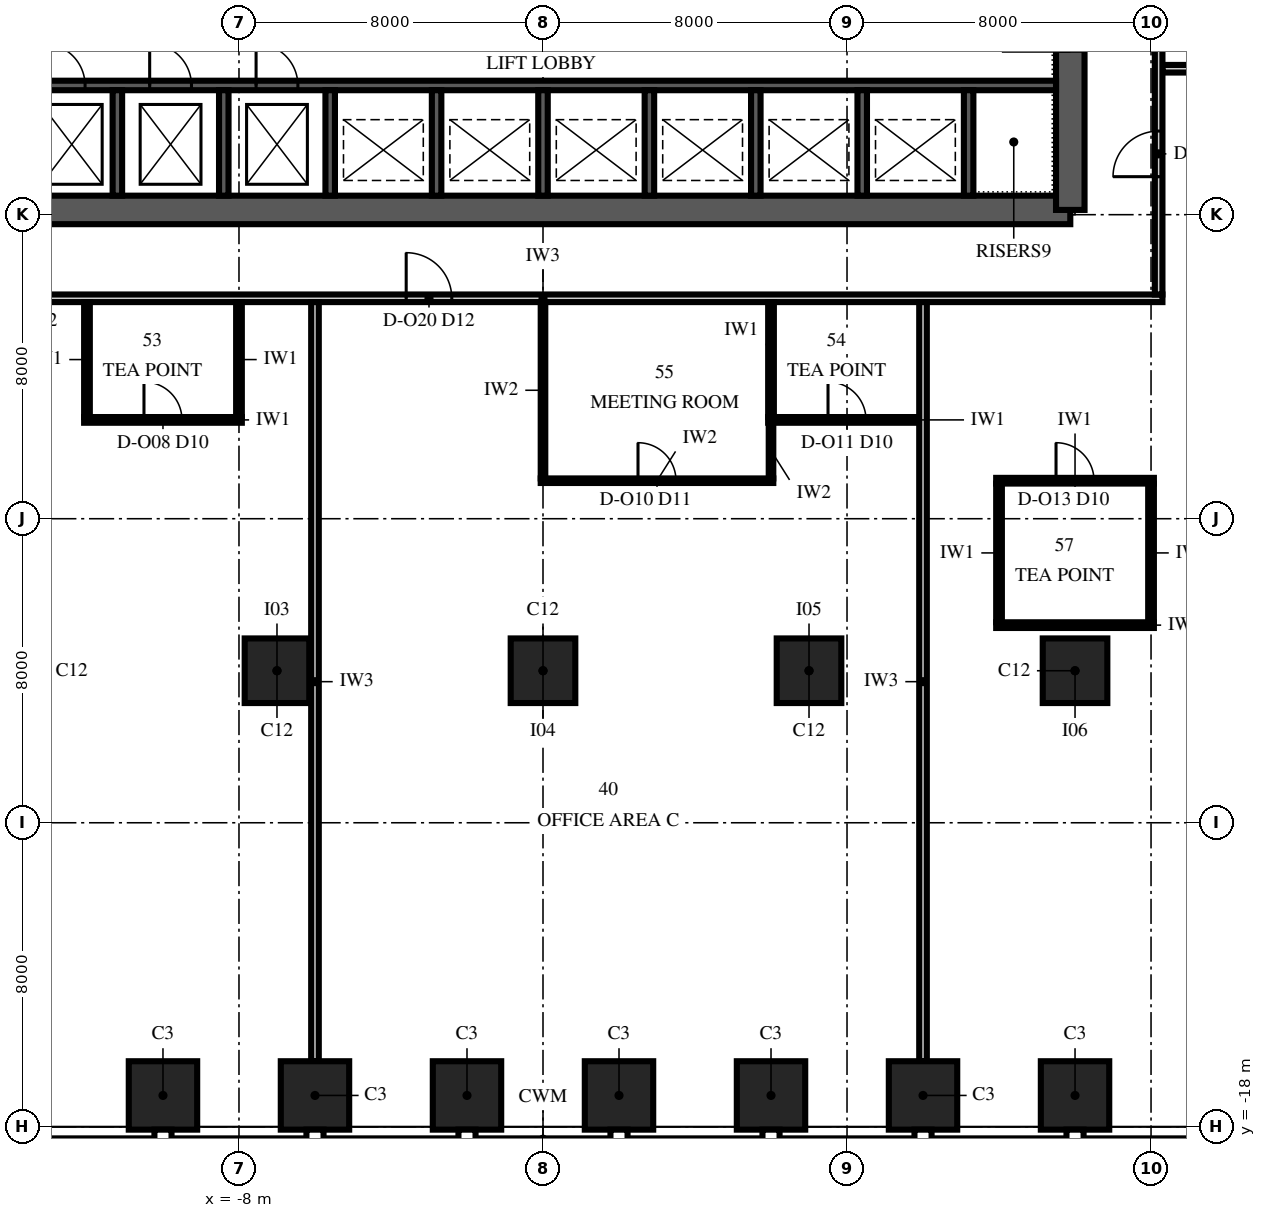
"""IFC4 building model, lengths in metres.
Left out: names, types, materials, properties, quantities, classifications, styles, units other than length and angle.
Written with IfcOpenShell. Run it as: python <this file> out.ifc"""

import sys

from ifc_helpers import new_model, si_unit, direction, frame, frame_2d, origin, origin_2d, place, context, subcontext, project, spatial, polyline, rectangle, outline, extrude, element, fill, save


model = new_model("IFC4")
c1 = context("Model", 3, precision=1e-05, world=origin(), true_north=direction((0.0, 1.0)))
c2 = subcontext(c1, "Body", "Model", "MODEL_VIEW")
j1 = project(units=[si_unit("LENGTHUNIT", "METRE"), si_unit("PLANEANGLEUNIT", "RADIAN")], contexts=[c1])
p1 = place(None, origin())
s1 = spatial("IfcSite", under=j1, at=p1, CompositionType="ELEMENT")
p2 = place(p1, origin())
s2 = spatial("IfcBuilding", under=s1, at=p2, CompositionType="ELEMENT")
p3 = place(p2, frame((0.0, 0.0, 151.0)))
s3 = spatial("IfcBuildingStorey", under=s2, at=p3, CompositionType="ELEMENT", Elevation=151.0)
for number, where, z_axis, x_axis in (
    (1, (-10.0, -17.175, 0.0), (0.0, 0.0, 1.0), (1.0, 0.0, 0.0)),
    (2, (-6.0, -17.175, 0.0), (0.0, 0.0, 1.0), (1.0, 0.0, 0.0)),
    (3, (-2.0, -17.175, 0.0), (0.0, 0.0, 1.0), (1.0, 0.0, 0.0)),
    (4, (2.0, -17.175, 0.0), (0.0, 0.0, 1.0), (1.0, 0.0, 0.0)),
    (5, (6.0, -17.175, 0.0), (0.0, 0.0, 1.0), (1.0, 0.0, 0.0)),
    (6, (10.0, -17.175, 0.0), (0.0, 0.0, 1.0), (1.0, 0.0, 0.0)),
    (7, (14.0, -17.175, 0.0), (0.0, 0.0, 1.0), (1.0, 0.0, 0.0)),
):
    element("IfcColumn", number, at=place(p3, frame(where, z_axis=z_axis, x_axis=x_axis)), inside=s3, PredefinedType="COLUMN", context=c2, shape_type="SweptSolid", body=[
        extrude(rectangle(XDim=1.8, YDim=1.8, at=origin_2d()), origin(), (0.0, 0.0, 1.0), 4.0),
    ])
for number, where, z_axis, x_axis in (
    (8, (-7.0, -6.0, 0.0), (0.0, 0.0, 1.0), (1.0, 0.0, 0.0)),
    (9, (0.0, -6.0, 0.0), (0.0, 0.0, 1.0), (1.0, 0.0, 0.0)),
    (10, (7.0, -6.0, 0.0), (0.0, 0.0, 1.0), (1.0, 0.0, 0.0)),
    (11, (14.0, -6.0, 0.0), (0.0, 0.0, 1.0), (1.0, 0.0, 0.0)),
):
    element("IfcColumn", number, at=place(p3, frame(where, z_axis=z_axis, x_axis=x_axis)), inside=s3, PredefinedType="COLUMN", context=c2, shape_type="SweptSolid", body=[
        extrude(rectangle(XDim=1.7, YDim=1.7, at=origin_2d()), origin(), (0.0, 0.0, 1.0), 4.0),
    ])
p4 = place(p3, frame((-13.875, 6.125, 0.0), z_axis=(0.0, 0.0, 1.0), x_axis=(1.0, 0.0, 0.0)))
e12 = element("IfcWall", 12, at=p4, inside=s3, PredefinedType="SHEAR", context=c2, shape_type="SweptSolid", body=[
    extrude(rectangle(XDim=27.75, YDim=0.75, at=frame_2d((13.875, 0.0))), origin(), (0.0, 0.0, 1.0), 4.0),
])
p5 = place(p3, frame((13.875, 6.125, 0.0), z_axis=(0.0, 0.0, 1.0), x_axis=(0.0, 1.0, 0.0)))
e13 = element("IfcWall", 13, at=p5, inside=s3, PredefinedType="SHEAR", context=c2, shape_type="SweptSolid", body=[
    extrude(outline(polyline([(0.0, -0.375), (17.75, -0.375), (17.75, 0.0), (17.375, 0.0), (17.375, 0.375), (0.375, 0.375), (0.375, 0.0), (0.0, 0.0), (0.0, -0.375)])), origin(), (0.0, 0.0, 1.0), 4.0),
])
p6 = place(p5, frame((4.175, 0.0, 0.0)))
e14 = element("IfcOpeningElement", 14, at=p6, cuts=e13, PredefinedType="OPENING", context=c2, shape_type="SweptSolid", body=[
    extrude(rectangle(XDim=1.8, YDim=2.4, at=frame_2d((0.9, 1.2))), frame((0.0, 0.39, 0.0), z_axis=(0.0, -1.0, 0.0), x_axis=(1.0, 0.0, 0.0)), (0.0, 0.0, 1.0), 0.78),
])
p7 = place(p3, frame((-13.5, 9.4, 0.0), z_axis=(0.0, 0.0, 1.0), x_axis=(1.0, 0.0, 0.0)))
e15 = element("IfcWall", 15, at=p7, inside=s3, PredefinedType="SHEAR", context=c2, shape_type="SweptSolid", body=[
    extrude(rectangle(XDim=27.0, YDim=0.25, at=frame_2d((13.5, 0.0))), origin(), (0.0, 0.0, 1.0), 4.0),
])
p8 = place(p7, frame((0.35, 0.0, 0.0)))
e16 = element("IfcOpeningElement", 16, at=p8, cuts=e15, PredefinedType="OPENING", context=c2, shape_type="SweptSolid", body=[
    extrude(rectangle(XDim=1.1, YDim=2.1, at=frame_2d((0.55, 1.05))), frame((0.0, 0.14, 0.0), z_axis=(0.0, -1.0, 0.0), x_axis=(1.0, 0.0, 0.0)), (0.0, 0.0, 1.0), 0.28),
])
p9 = place(p7, frame((3.15, 0.0, 0.0)))
e17 = element("IfcOpeningElement", 17, at=p9, cuts=e15, PredefinedType="OPENING", context=c2, shape_type="SweptSolid", body=[
    extrude(rectangle(XDim=1.1, YDim=2.1, at=frame_2d((0.55, 1.05))), frame((0.0, 0.14, 0.0), z_axis=(0.0, -1.0, 0.0), x_axis=(1.0, 0.0, 0.0)), (0.0, 0.0, 1.0), 0.28),
])
p10 = place(p7, frame((5.95, 0.0, 0.0)))
e18 = element("IfcOpeningElement", 18, at=p10, cuts=e15, PredefinedType="OPENING", context=c2, shape_type="SweptSolid", body=[
    extrude(rectangle(XDim=1.1, YDim=2.1, at=frame_2d((0.55, 1.05))), frame((0.0, 0.14, 0.0), z_axis=(0.0, -1.0, 0.0), x_axis=(1.0, 0.0, 0.0)), (0.0, 0.0, 1.0), 0.28),
])
for number, where, z_axis, x_axis in (
    (19, (-11.2, 6.5, 0.0), (0.0, 0.0, 1.0), (0.0, 1.0, 0.0)),
    (20, (-8.4, 6.5, 0.0), (0.0, 0.0, 1.0), (0.0, 1.0, 0.0)),
    (21, (-5.6, 6.5, 0.0), (0.0, 0.0, 1.0), (0.0, 1.0, 0.0)),
    (22, (-2.8, 6.5, 0.0), (0.0, 0.0, 1.0), (0.0, 1.0, 0.0)),
    (23, (0.0, 6.5, 0.0), (0.0, 0.0, 1.0), (0.0, 1.0, 0.0)),
    (24, (2.8, 6.5, 0.0), (0.0, 0.0, 1.0), (0.0, 1.0, 0.0)),
    (25, (5.6, 6.5, 0.0), (0.0, 0.0, 1.0), (0.0, 1.0, 0.0)),
    (26, (8.4, 6.5, 0.0), (0.0, 0.0, 1.0), (0.0, 1.0, 0.0)),
    (27, (11.2, 6.5, 0.0), (0.0, 0.0, 1.0), (0.0, 1.0, 0.0)),
):
    element("IfcWall", number, at=place(p3, frame(where, z_axis=z_axis, x_axis=x_axis)), inside=s3, PredefinedType="SHEAR", context=c2, shape_type="SweptSolid", body=[
        extrude(rectangle(XDim=2.775, YDim=0.25, at=frame_2d((1.387, 0.0))), origin(), (0.0, 0.0, 1.0), 4.0),
    ])
p11 = place(p3, frame((11.925, -4.8, 0.0), z_axis=(0.0, 0.0, 1.0), x_axis=(1.0, 0.0, 0.0)))
e28 = element("IfcWall", 28, at=p11, inside=s3, PredefinedType="PARTITIONING", context=c2, shape_type="SweptSolid", body=[
    extrude(rectangle(XDim=4.15, YDim=0.15, at=frame_2d((2.075, 0.0))), origin(), (0.0, 0.0, 1.0), 3.25),
])
p12 = place(p3, frame((-0.06, -1.0, 0.0), z_axis=(0.0, 0.0, 1.0), x_axis=(1.0, 0.0, 0.0)))
e29 = element("IfcWall", 29, at=p12, inside=s3, PredefinedType="PARTITIONING", context=c2, shape_type="SweptSolid", body=[
    extrude(rectangle(XDim=6.12, YDim=0.12, at=frame_2d((3.06, 0.0))), origin(), (0.0, 0.0, 1.0), 3.25),
])
p13 = place(p12, frame((2.56, 0.0, 0.0)))
e30 = element("IfcOpeningElement", 30, at=p13, cuts=e29, PredefinedType="OPENING", context=c2, shape_type="SweptSolid", body=[
    extrude(rectangle(XDim=1.0, YDim=2.4, at=frame_2d((0.5, 1.2))), frame((0.0, 0.075, 0.0), z_axis=(0.0, -1.0, 0.0), x_axis=(1.0, 0.0, 0.0)), (0.0, 0.0, 1.0), 0.15),
])
p14 = place(p3, frame((11.925, -1.0, 0.0), z_axis=(0.0, 0.0, 1.0), x_axis=(1.0, 0.0, 0.0)))
e31 = element("IfcWall", 31, at=p14, inside=s3, PredefinedType="PARTITIONING", context=c2, shape_type="SweptSolid", body=[
    extrude(rectangle(XDim=4.15, YDim=0.15, at=frame_2d((2.075, 0.0))), origin(), (0.0, 0.0, 1.0), 3.25),
])
p15 = place(p14, frame((1.575, 0.0, 0.0)))
e32 = element("IfcOpeningElement", 32, at=p15, cuts=e31, PredefinedType="OPENING", context=c2, shape_type="SweptSolid", body=[
    extrude(rectangle(XDim=1.0, YDim=2.3, at=frame_2d((0.5, 1.15))), frame((0.0, 0.09, 0.0), z_axis=(0.0, -1.0, 0.0), x_axis=(1.0, 0.0, 0.0)), (0.0, 0.0, 1.0), 0.18),
])
p16 = place(p3, frame((-12.075, 0.6, 0.0), z_axis=(0.0, 0.0, 1.0), x_axis=(1.0, 0.0, 0.0)))
e33 = element("IfcWall", 33, at=p16, inside=s3, PredefinedType="PARTITIONING", context=c2, shape_type="SweptSolid", body=[
    extrude(rectangle(XDim=4.15, YDim=0.15, at=frame_2d((2.075, 0.0))), origin(), (0.0, 0.0, 1.0), 3.25),
])
p17 = place(p16, frame((1.575, 0.0, 0.0)))
e34 = element("IfcOpeningElement", 34, at=p17, cuts=e33, PredefinedType="OPENING", context=c2, shape_type="SweptSolid", body=[
    extrude(rectangle(XDim=1.0, YDim=2.3, at=frame_2d((0.5, 1.15))), frame((0.0, 0.09, 0.0), z_axis=(0.0, -1.0, 0.0), x_axis=(1.0, 0.0, 0.0)), (0.0, 0.0, 1.0), 0.18),
])
p18 = place(p3, frame((5.925, 0.6, 0.0), z_axis=(0.0, 0.0, 1.0), x_axis=(1.0, 0.0, 0.0)))
e35 = element("IfcWall", 35, at=p18, inside=s3, PredefinedType="PARTITIONING", context=c2, shape_type="SweptSolid", body=[
    extrude(rectangle(XDim=3.975, YDim=0.15, at=frame_2d((1.987, 0.0))), origin(), (0.0, 0.0, 1.0), 3.85),
])
p19 = place(p18, frame((1.575, 0.0, 0.0)))
e36 = element("IfcOpeningElement", 36, at=p19, cuts=e35, PredefinedType="OPENING", context=c2, shape_type="SweptSolid", body=[
    extrude(rectangle(XDim=1.0, YDim=2.3, at=frame_2d((0.5, 1.15))), frame((0.0, 0.09, 0.0), z_axis=(0.0, -1.0, 0.0), x_axis=(1.0, 0.0, 0.0)), (0.0, 0.0, 1.0), 0.18),
])
p20 = place(p3, frame((-16.3, 3.8, 0.0), z_axis=(0.0, 0.0, 1.0), x_axis=(1.0, 0.0, 0.0)))
e37 = element("IfcWall", 37, at=p20, inside=s3, PredefinedType="PARTITIONING", context=c2, shape_type="SweptSolid", body=[
    extrude(rectangle(XDim=32.6, YDim=0.2, at=frame_2d((16.3, 0.0))), origin(), (0.0, 0.0, 1.0), 3.25),
])
p21 = place(p20, frame((1.7, 0.0, 0.0)))
e38 = element("IfcOpeningElement", 38, at=p21, cuts=e37, PredefinedType="OPENING", context=c2, shape_type="SweptSolid", body=[
    extrude(rectangle(XDim=1.2, YDim=2.4, at=frame_2d((0.6, 1.2))), frame((0.0, 0.115, 0.0), z_axis=(0.0, -1.0, 0.0), x_axis=(1.0, 0.0, 0.0)), (0.0, 0.0, 1.0), 0.23),
])
p22 = place(p20, frame((12.7, 0.0, 0.0)))
e39 = element("IfcOpeningElement", 39, at=p22, cuts=e37, PredefinedType="OPENING", context=c2, shape_type="SweptSolid", body=[
    extrude(rectangle(XDim=1.2, YDim=2.4, at=frame_2d((0.6, 1.2))), frame((0.0, 0.115, 0.0), z_axis=(0.0, -1.0, 0.0), x_axis=(1.0, 0.0, 0.0)), (0.0, 0.0, 1.0), 0.23),
])
p23 = place(p3, frame((16.3, 9.84, 0.0), z_axis=(0.0, 0.0, 1.0), x_axis=(1.0, 0.0, 0.0)))
e40 = element("IfcWall", 40, at=p23, inside=s3, PredefinedType="PARTITIONING", context=c2, shape_type="SweptSolid", body=[
    extrude(rectangle(XDim=9.373, YDim=0.2, at=frame_2d((4.687, 0.0))), origin(), (0.0, 0.0, 1.0), 3.25),
])
for number, where, z_axis, x_axis in (
    (41, (-12.0, 0.675, 0.0), (0.0, 0.0, 1.0), (0.0, 1.0, 0.0)),
    (42, (-8.0, 0.675, 0.0), (0.0, 0.0, 1.0), (0.0, 1.0, 0.0)),
):
    element("IfcWall", number, at=place(p3, frame(where, z_axis=z_axis, x_axis=x_axis)), inside=s3, PredefinedType="PARTITIONING", context=c2, shape_type="SweptSolid", body=[
        extrude(rectangle(XDim=3.025, YDim=0.15, at=frame_2d((1.512, 0.0))), origin(), (0.0, 0.0, 1.0), 3.85),
    ])
p24 = place(p3, frame((-6.0, -16.275, 0.0), z_axis=(0.0, 0.0, 1.0), x_axis=(0.0, 1.0, 0.0)))
e43 = element("IfcWall", 43, at=p24, inside=s3, PredefinedType="PARTITIONING", context=c2, shape_type="SweptSolid", body=[
    extrude(rectangle(XDim=19.975, YDim=0.2, at=frame_2d((9.987, 0.0))), origin(), (0.0, 0.0, 1.0), 2.842),
])
p25 = place(p3, frame((0.0, -0.94, 0.0), z_axis=(0.0, 0.0, 1.0), x_axis=(0.0, 1.0, 0.0)))
e44 = element("IfcWall", 44, at=p25, inside=s3, PredefinedType="PARTITIONING", context=c2, shape_type="SweptSolid", body=[
    extrude(rectangle(XDim=4.64, YDim=0.12, at=frame_2d((2.32, 0.0))), origin(), (0.0, 0.0, 1.0), 3.85),
])
p26 = place(p3, frame((6.0, -0.94, 0.0), z_axis=(0.0, 0.0, 1.0), x_axis=(0.0, 1.0, 0.0)))
e45 = element("IfcWall", 45, at=p26, inside=s3, PredefinedType="PARTITIONING", context=c2, shape_type="SweptSolid", body=[
    extrude(rectangle(XDim=1.465, YDim=0.12, at=frame_2d((0.732, 0.0))), origin(), (0.0, 0.0, 1.0), 3.85),
])
p27 = place(p3, frame((6.0, 0.675, 0.0), z_axis=(0.0, 0.0, 1.0), x_axis=(0.0, 1.0, 0.0)))
e46 = element("IfcWall", 46, at=p27, inside=s3, PredefinedType="PARTITIONING", context=c2, shape_type="SweptSolid", body=[
    extrude(rectangle(XDim=3.025, YDim=0.15, at=frame_2d((1.512, 0.0))), origin(), (0.0, 0.0, 1.0), 3.85),
])
p28 = place(p3, frame((10.0, -16.275, 0.0), z_axis=(0.0, 0.0, 1.0), x_axis=(0.0, 1.0, 0.0)))
e47 = element("IfcWall", 47, at=p28, inside=s3, PredefinedType="PARTITIONING", context=c2, shape_type="SweptSolid", body=[
    extrude(rectangle(XDim=19.975, YDim=0.2, at=frame_2d((9.987, 0.0))), origin(), (0.0, 0.0, 1.0), 2.842),
])
for number, where, z_axis, x_axis in (
    (48, (12.0, -4.725, 0.0), (0.0, 0.0, 1.0), (0.0, 1.0, 0.0)),
    (49, (16.0, -4.725, 0.0), (0.0, 0.0, 1.0), (0.0, 1.0, 0.0)),
):
    element("IfcWall", number, at=place(p3, frame(where, z_axis=z_axis, x_axis=x_axis)), inside=s3, PredefinedType="PARTITIONING", context=c2, shape_type="SweptSolid", body=[
        extrude(rectangle(XDim=3.65, YDim=0.15, at=frame_2d((1.825, 0.0))), origin(), (0.0, 0.0, 1.0), 3.85),
    ])
p29 = place(p3, frame((16.2, 3.9, 0.0), z_axis=(0.0, 0.0, 1.0), x_axis=(0.0, 1.0, 0.0)))
e50 = element("IfcWall", 50, at=p29, inside=s3, PredefinedType="PARTITIONING", context=c2, shape_type="SweptSolid", body=[
    extrude(rectangle(XDim=24.375, YDim=0.2, at=frame_2d((12.188, 0.0))), origin(), (0.0, 0.0, 1.0), 2.842),
])
p30 = place(p29, frame((3.1, 0.0, 0.0)))
e51 = element("IfcOpeningElement", 51, at=p30, cuts=e50, PredefinedType="OPENING", context=c2, shape_type="SweptSolid", body=[
    extrude(rectangle(XDim=1.2, YDim=2.4, at=frame_2d((0.6, 1.2))), frame((0.0, 0.115, 0.0), z_axis=(0.0, -1.0, 0.0), x_axis=(1.0, 0.0, 0.0)), (0.0, 0.0, 1.0), 0.23),
])
p31 = place(p29, frame((10.5, 0.0, 0.0)))
e52 = element("IfcOpeningElement", 52, at=p31, cuts=e50, PredefinedType="OPENING", context=c2, shape_type="SweptSolid", body=[
    extrude(rectangle(XDim=1.2, YDim=2.4, at=frame_2d((0.6, 1.2))), frame((0.0, 0.115, 0.0), z_axis=(0.0, -1.0, 0.0), x_axis=(1.0, 0.0, 0.0)), (0.0, 0.0, 1.0), 0.23),
])
p32 = place(p8, origin())
e53 = element("IfcDoor", 53, at=p32, inside=s3, OperationType="SLIDING_TO_LEFT", PredefinedType="DOOR", context=c2, shape_type="SweptSolid", body=[
    extrude(rectangle(XDim=1.1, YDim=2.1, at=frame_2d((0.55, 1.05))), frame((0.0, 0.125, 0.0), z_axis=(0.0, -1.0, 0.0), x_axis=(1.0, 0.0, 0.0)), (0.0, 0.0, 1.0), 0.25),
])
fill(e16, e53)
p33 = place(p9, origin())
e54 = element("IfcDoor", 54, at=p33, inside=s3, OperationType="SLIDING_TO_LEFT", PredefinedType="DOOR", context=c2, shape_type="SweptSolid", body=[
    extrude(rectangle(XDim=1.1, YDim=2.1, at=frame_2d((0.55, 1.05))), frame((0.0, 0.125, 0.0), z_axis=(0.0, -1.0, 0.0), x_axis=(1.0, 0.0, 0.0)), (0.0, 0.0, 1.0), 0.25),
])
fill(e17, e54)
p34 = place(p10, origin())
e55 = element("IfcDoor", 55, at=p34, inside=s3, OperationType="SLIDING_TO_LEFT", PredefinedType="DOOR", context=c2, shape_type="SweptSolid", body=[
    extrude(rectangle(XDim=1.1, YDim=2.1, at=frame_2d((0.55, 1.05))), frame((0.0, 0.125, 0.0), z_axis=(0.0, -1.0, 0.0), x_axis=(1.0, 0.0, 0.0)), (0.0, 0.0, 1.0), 0.25),
])
fill(e18, e55)
p35 = place(p17, origin())
e56 = element("IfcDoor", 56, at=p35, inside=s3, OperationType="SINGLE_SWING_LEFT", PredefinedType="DOOR", context=c2, shape_type="SweptSolid", body=[
    extrude(rectangle(XDim=1.0, YDim=2.3, at=frame_2d((0.5, 1.15))), frame((0.0, 0.075, 0.0), z_axis=(0.0, -1.0, 0.0), x_axis=(1.0, 0.0, 0.0)), (0.0, 0.0, 1.0), 0.149),
])
fill(e34, e56)
p36 = place(p13, origin())
e57 = element("IfcDoor", 57, at=p36, inside=s3, OperationType="SINGLE_SWING_RIGHT", PredefinedType="DOOR", context=c2, shape_type="SweptSolid", body=[
    extrude(rectangle(XDim=1.0, YDim=2.4, at=frame_2d((0.5, 1.2))), frame((0.0, 0.06, 0.0), z_axis=(0.0, -1.0, 0.0), x_axis=(1.0, 0.0, 0.0)), (0.0, 0.0, 1.0), 0.12),
])
fill(e30, e57)
p37 = place(p19, origin())
e58 = element("IfcDoor", 58, at=p37, inside=s3, OperationType="SINGLE_SWING_LEFT", PredefinedType="DOOR", context=c2, shape_type="SweptSolid", body=[
    extrude(rectangle(XDim=1.0, YDim=2.3, at=frame_2d((0.5, 1.15))), frame((0.0, 0.075, 0.0), z_axis=(0.0, -1.0, 0.0), x_axis=(1.0, 0.0, 0.0)), (0.0, 0.0, 1.0), 0.149),
])
fill(e36, e58)
p38 = place(p15, origin())
e59 = element("IfcDoor", 59, at=p38, inside=s3, OperationType="SINGLE_SWING_LEFT", PredefinedType="DOOR", context=c2, shape_type="SweptSolid", body=[
    extrude(rectangle(XDim=1.0, YDim=2.3, at=frame_2d((0.5, 1.15))), frame((0.0, 0.075, 0.0), z_axis=(0.0, -1.0, 0.0), x_axis=(1.0, 0.0, 0.0)), (0.0, 0.0, 1.0), 0.149),
])
fill(e32, e59)
p39 = place(p22, origin())
e60 = element("IfcDoor", 60, at=p39, inside=s3, OperationType="SINGLE_SWING_LEFT", PredefinedType="DOOR", context=c2, shape_type="SweptSolid", body=[
    extrude(rectangle(XDim=1.2, YDim=2.4, at=frame_2d((0.6, 1.2))), frame((0.0, 0.1, 0.0), z_axis=(0.0, -1.0, 0.0), x_axis=(1.0, 0.0, 0.0)), (0.0, 0.0, 1.0), 0.199),
])
fill(e39, e60)
p40 = place(p30, origin())
e61 = element("IfcDoor", 61, at=p40, inside=s3, OperationType="SINGLE_SWING_LEFT", PredefinedType="DOOR", context=c2, shape_type="SweptSolid", body=[
    extrude(rectangle(XDim=1.2, YDim=2.4, at=frame_2d((0.6, 1.2))), frame((0.0, 0.1, 0.0), z_axis=(0.0, -1.0, 0.0), x_axis=(1.0, 0.0, 0.0)), (0.0, 0.0, 1.0), 0.199),
])
fill(e51, e61)
save(model, sys.argv[1])
